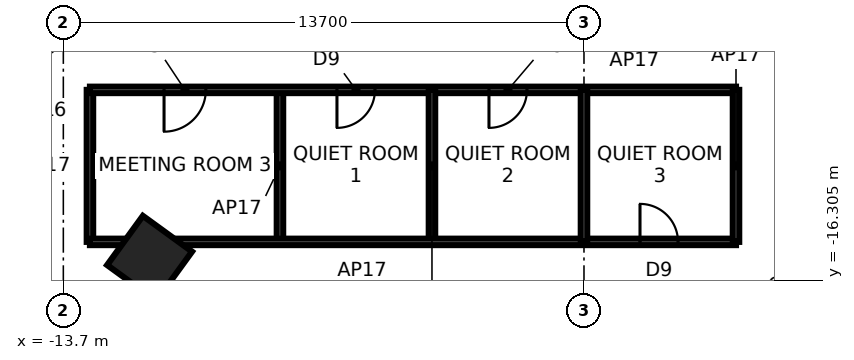
"""IFC4 building model, lengths in metres.
Left out: names, types, materials, properties, quantities, classifications, styles, units other than length and angle.
Written with IfcOpenShell. Run it as: python <this file> out.ifc"""

import sys

from ifc_helpers import new_model, si_unit, direction, frame, frame_2d, origin, origin_2d, place, context, subcontext, project, spatial, rectangle, extrude, element, fill, save


model = new_model("IFC4")
c1 = context("Model", 3, precision=1e-05, world=origin(), true_north=direction((0.0, 1.0)))
c2 = subcontext(c1, "Body", "Model", "MODEL_VIEW")
j1 = project(units=[si_unit("LENGTHUNIT", "METRE"), si_unit("PLANEANGLEUNIT", "RADIAN")], contexts=[c1])
p1 = place(None, origin())
s1 = spatial("IfcSite", under=j1, at=p1, CompositionType="ELEMENT")
p2 = place(p1, origin())
s2 = spatial("IfcBuilding", under=s1, at=p2, CompositionType="ELEMENT")
p3 = place(p2, frame((0.0, 0.0, 135.3)))
s3 = spatial("IfcBuildingStorey", under=s2, at=p3, CompositionType="ELEMENT", Elevation=135.3)
p4 = place(p3, frame((-11.43, -15.733, 0.0), z_axis=(0.0, 0.0, 1.0), x_axis=(-0.587785252292, -0.809016994375, 0.0)))
e1 = element("IfcColumn", 1, at=p4, inside=s3, PredefinedType="COLUMN", context=c2, shape_type="SweptSolid", body=[
    extrude(rectangle(XDim=1.6, YDim=1.6, at=origin_2d()), origin(), (0.0, 0.0, 1.0), 3.9),
])
p5 = place(p3, frame((-13.076, -9.5, 0.0), z_axis=(0.0, 0.0, 1.0), x_axis=(-0.809023630932, -0.587776117747, 0.0)))
e2 = element("IfcWall", 2, at=p5, inside=s3, PredefinedType="PARTITIONING", context=c2, shape_type="SweptSolid", body=[
    extrude(rectangle(XDim=7.157, YDim=0.12, at=frame_2d((3.579, 0.0))), origin(), (0.0, 0.0, 1.0), 2.94),
])
p6 = place(p5, frame((2.202, 0.0, 0.0)))
e3 = element("IfcOpeningElement", 3, at=p6, cuts=e2, PredefinedType="OPENING", context=c2, shape_type="SweptSolid", body=[
    extrude(rectangle(XDim=1.0, YDim=2.4, at=frame_2d((0.5, 1.2))), frame((0.0, 0.07, 0.0), z_axis=(0.0, -1.0, 0.0), x_axis=(1.0, 0.0, 0.0)), (0.0, 0.0, 1.0), 0.14),
])
for number, where, z_axis, x_axis in (
    (4, (-13.0, -15.3, 0.0), (0.0, 0.0, 1.0), (0.0, 1.0, 0.0)),
    (5, (-8.0, -11.3, 0.0), (0.0, 0.0, 1.0), (0.0, -1.0, 0.0)),
):
    element("IfcWall", number, at=place(p3, frame(where, z_axis=z_axis, x_axis=x_axis)), inside=s3, PredefinedType="PARTITIONING", context=c2, shape_type="SweptSolid", body=[
        extrude(rectangle(XDim=4.0, YDim=0.17, at=frame_2d((2.0, 0.0))), origin(), (0.0, 0.0, 1.0), 3.74),
    ])
p7 = place(p3, frame((-13.0, -11.3, 0.0), z_axis=(0.0, 0.0, 1.0), x_axis=(1.0, 0.0, 0.0)))
e6 = element("IfcWall", 6, at=p7, inside=s3, PredefinedType="PARTITIONING", context=c2, shape_type="SweptSolid", body=[
    extrude(rectangle(XDim=17.0, YDim=0.17, at=frame_2d((8.5, 0.0))), origin(), (0.0, 0.0, 1.0), 3.74),
])
p8 = place(p7, frame((1.95, 0.0, 0.0)))
e7 = element("IfcOpeningElement", 7, at=p8, cuts=e6, PredefinedType="OPENING", context=c2, shape_type="SweptSolid", body=[
    extrude(rectangle(XDim=1.1, YDim=2.4, at=frame_2d((0.55, 1.2))), frame((0.0, 0.095, 0.0), z_axis=(0.0, -1.0, 0.0), x_axis=(1.0, 0.0, 0.0)), (0.0, 0.0, 1.0), 0.19),
])
p9 = place(p7, frame((6.5, 0.0, 0.0)))
e8 = element("IfcOpeningElement", 8, at=p9, cuts=e6, PredefinedType="OPENING", context=c2, shape_type="SweptSolid", body=[
    extrude(rectangle(XDim=1.0, YDim=2.4, at=frame_2d((0.5, 1.2))), frame((0.0, 0.095, 0.0), z_axis=(0.0, -1.0, 0.0), x_axis=(1.0, 0.0, 0.0)), (0.0, 0.0, 1.0), 0.19),
])
p10 = place(p7, frame((10.5, 0.0, 0.0)))
e9 = element("IfcOpeningElement", 9, at=p10, cuts=e6, PredefinedType="OPENING", context=c2, shape_type="SweptSolid", body=[
    extrude(rectangle(XDim=1.0, YDim=2.4, at=frame_2d((0.5, 1.2))), frame((0.0, 0.095, 0.0), z_axis=(0.0, -1.0, 0.0), x_axis=(1.0, 0.0, 0.0)), (0.0, 0.0, 1.0), 0.19),
])
p11 = place(p3, frame((-4.0, -11.3, 0.0), z_axis=(0.0, 0.0, 1.0), x_axis=(0.0, -1.0, 0.0)))
e10 = element("IfcWall", 10, at=p11, inside=s3, PredefinedType="PARTITIONING", context=c2, shape_type="SweptSolid", body=[
    extrude(rectangle(XDim=4.0, YDim=0.17, at=frame_2d((2.0, 0.0))), origin(), (0.0, 0.0, 1.0), 3.74),
])
p12 = place(p3, frame((4.0, -15.3, 0.0), z_axis=(0.0, 0.0, 1.0), x_axis=(-1.0, 0.0, 0.0)))
e11 = element("IfcWall", 11, at=p12, inside=s3, PredefinedType="PARTITIONING", context=c2, shape_type="SweptSolid", body=[
    extrude(rectangle(XDim=17.0, YDim=0.17, at=frame_2d((8.5, 0.0))), origin(), (0.0, 0.0, 1.0), 3.286),
])
p13 = place(p12, frame((1.526, 0.0, 0.0)))
e12 = element("IfcOpeningElement", 12, at=p13, cuts=e11, PredefinedType="OPENING", context=c2, shape_type="SweptSolid", body=[
    extrude(rectangle(XDim=1.0, YDim=2.4, at=frame_2d((0.5, 1.2))), frame((0.0, 0.095, 0.0), z_axis=(0.0, -1.0, 0.0), x_axis=(1.0, 0.0, 0.0)), (0.0, 0.0, 1.0), 0.19),
])
p14 = place(p3, frame((0.0, -11.3, 0.0), z_axis=(0.0, 0.0, 1.0), x_axis=(0.0, -1.0, 0.0)))
e13 = element("IfcWall", 13, at=p14, inside=s3, PredefinedType="PARTITIONING", context=c2, shape_type="SweptSolid", body=[
    extrude(rectangle(XDim=4.0, YDim=0.17, at=frame_2d((2.0, 0.0))), origin(), (0.0, 0.0, 1.0), 2.94),
])
p15 = place(p3, frame((4.0, -11.3, 0.0), z_axis=(0.0, 0.0, 1.0), x_axis=(0.0, -1.0, 0.0)))
e14 = element("IfcWall", 14, at=p15, inside=s3, PredefinedType="PARTITIONING", context=c2, shape_type="SweptSolid", body=[
    extrude(rectangle(XDim=4.0, YDim=0.17, at=frame_2d((2.0, 0.0))), origin(), (0.0, 0.0, 1.0), 3.74),
])
p16 = place(p8, frame((1.1, 0.0, 0.0), z_axis=(0.0, 0.0, 1.0), x_axis=(-1.0, 0.0, 0.0)))
e15 = element("IfcDoor", 15, at=p16, inside=s3, OperationType="SINGLE_SWING_RIGHT", PredefinedType="DOOR", context=c2, shape_type="SweptSolid", body=[
    extrude(rectangle(XDim=1.1, YDim=2.4, at=frame_2d((0.55, 1.2))), frame((0.0, 0.025, 0.0), z_axis=(0.0, -1.0, 0.0), x_axis=(1.0, 0.0, 0.0)), (0.0, 0.0, 1.0), 0.05),
])
fill(e7, e15)
p17 = place(p9, frame((1.0, 0.0, 0.0), z_axis=(0.0, 0.0, 1.0), x_axis=(-1.0, 0.0, 0.0)))
e16 = element("IfcDoor", 16, at=p17, inside=s3, OperationType="SINGLE_SWING_RIGHT", PredefinedType="DOOR", context=c2, shape_type="SweptSolid", body=[
    extrude(rectangle(XDim=1.0, YDim=2.4, at=frame_2d((0.5, 1.2))), frame((0.0, 0.025, 0.0), z_axis=(0.0, -1.0, 0.0), x_axis=(1.0, 0.0, 0.0)), (0.0, 0.0, 1.0), 0.05),
])
fill(e8, e16)
p18 = place(p10, frame((1.0, 0.0, 0.0), z_axis=(0.0, 0.0, 1.0), x_axis=(-1.0, 0.0, 0.0)))
e17 = element("IfcDoor", 17, at=p18, inside=s3, OperationType="SINGLE_SWING_RIGHT", PredefinedType="DOOR", context=c2, shape_type="SweptSolid", body=[
    extrude(rectangle(XDim=1.0, YDim=2.4, at=frame_2d((0.5, 1.2))), frame((0.0, 0.025, 0.0), z_axis=(0.0, -1.0, 0.0), x_axis=(1.0, 0.0, 0.0)), (0.0, 0.0, 1.0), 0.05),
])
fill(e9, e17)
p19 = place(p13, frame((1.0, 0.0, 0.0), z_axis=(0.0, 0.0, 1.0), x_axis=(-1.0, 0.0, 0.0)))
e18 = element("IfcDoor", 18, at=p19, inside=s3, OperationType="SINGLE_SWING_LEFT", PredefinedType="DOOR", context=c2, shape_type="SweptSolid", body=[
    extrude(rectangle(XDim=1.0, YDim=2.4, at=frame_2d((0.5, 1.2))), frame((0.0, 0.025, 0.0), z_axis=(0.0, -1.0, 0.0), x_axis=(1.0, 0.0, 0.0)), (0.0, 0.0, 1.0), 0.05),
])
fill(e12, e18)
save(model, sys.argv[1])
